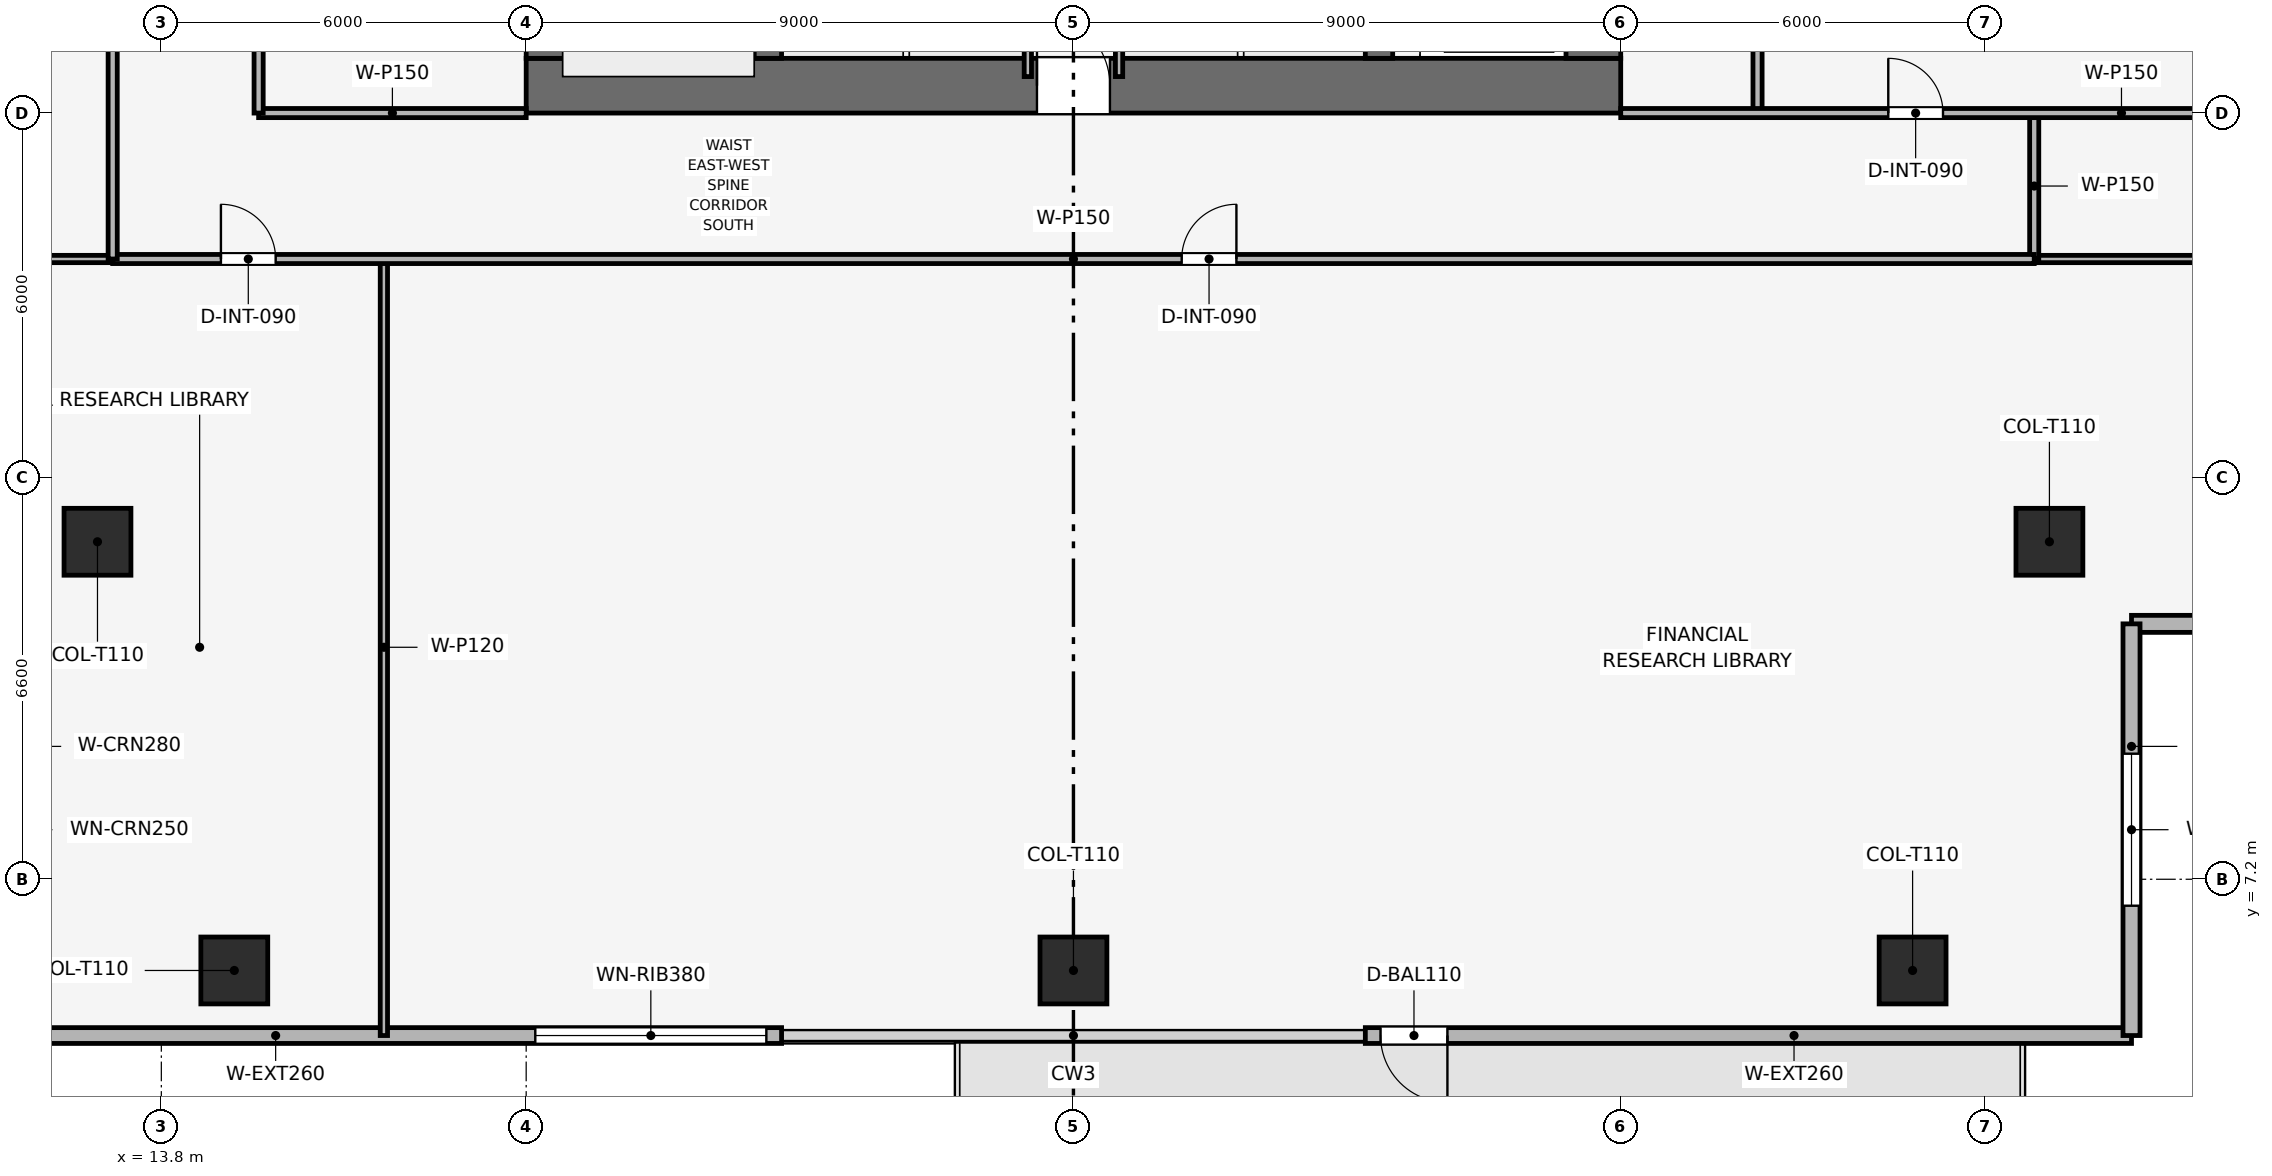
"""IFC4 building model, lengths in metres.
Left out: names, types, materials, properties, quantities, classifications, styles, units other than length and angle.
Written with IfcOpenShell. Run it as: python <this file> out.ifc"""

import sys

from ifc_helpers import new_model, si_unit, direction, frame, frame_2d, origin, origin_2d, place, context, subcontext, project, spatial, rectangle, extrude, element, fill, save


model = new_model("IFC4")
c1 = context("Model", 3, precision=1e-05, world=origin(), true_north=direction((0.0, 1.0)))
c2 = subcontext(c1, "Body", "Model", "MODEL_VIEW")
j1 = project(units=[si_unit("LENGTHUNIT", "METRE"), si_unit("PLANEANGLEUNIT", "RADIAN")], contexts=[c1])
p1 = place(None, origin())
s1 = spatial("IfcSite", under=j1, at=p1, CompositionType="ELEMENT")
p2 = place(p1, origin())
s2 = spatial("IfcBuilding", under=s1, at=p2, CompositionType="ELEMENT")
p3 = place(p2, frame((0.0, 0.0, 164.55)))
s3 = spatial("IfcBuildingStorey", under=s2, at=p3, CompositionType="ELEMENT", Elevation=164.55)
p4 = place(p3, frame((19.8, 20.25, 0.0), z_axis=(0.0, 0.0, 1.0), x_axis=(1.0, 0.0, 0.0)))
e1 = element("IfcWall", 1, at=p4, inside=s3, PredefinedType="SHEAR", context=c2, shape_type="SweptSolid", body=[
    extrude(rectangle(XDim=18.0, YDim=0.9, at=frame_2d((9.0, 0.0))), origin(), (0.0, 0.0, 1.0), 3.75),
])
p5 = place(p4, frame((8.4, 0.0, 0.0)))
e2 = element("IfcOpeningElement", 2, at=p5, cuts=e1, PredefinedType="OPENING", context=c2, shape_type="SweptSolid", body=[
    extrude(rectangle(XDim=1.2, YDim=2.2, at=frame_2d((0.6, 1.1))), frame((0.0, 0.46, 0.0), z_axis=(0.0, -1.0, 0.0), x_axis=(1.0, 0.0, 0.0)), (0.0, 0.0, 1.0), 0.92),
])
p6 = place(p3, frame((20.25, 20.7, 0.0), z_axis=(0.0, 0.0, 1.0), x_axis=(0.0, 1.0, 0.0)))
e3 = element("IfcWall", 3, at=p6, inside=s3, PredefinedType="SHEAR", context=c2, shape_type="SweptSolid", body=[
    extrude(rectangle(XDim=16.2, YDim=0.9, at=frame_2d((8.1, 0.0))), origin(), (0.0, 0.0, 1.0), 3.75),
])
p7 = place(p6, frame((10.1, 0.0, 0.0)))
e4 = element("IfcOpeningElement", 4, at=p7, cuts=e3, PredefinedType="OPENING", context=c2, shape_type="SweptSolid", body=[
    extrude(rectangle(XDim=1.1, YDim=2.15, at=frame_2d((0.55, 1.075))), frame((0.0, 0.46, 0.0), z_axis=(0.0, -1.0, 0.0), x_axis=(1.0, 0.0, 0.0)), (0.0, 0.0, 1.0), 0.92),
])
p8 = place(p3, frame((37.35, 20.7, 0.0), z_axis=(0.0, 0.0, 1.0), x_axis=(0.0, 1.0, 0.0)))
e5 = element("IfcWall", 5, at=p8, inside=s3, PredefinedType="SHEAR", context=c2, shape_type="SweptSolid", body=[
    extrude(rectangle(XDim=16.2, YDim=0.9, at=frame_2d((8.1, 0.0))), origin(), (0.0, 0.0, 1.0), 3.75),
])
p9 = place(p8, frame((4.6, 0.0, 0.0)))
e6 = element("IfcOpeningElement", 6, at=p9, cuts=e5, PredefinedType="OPENING", context=c2, shape_type="SweptSolid", body=[
    extrude(rectangle(XDim=1.1, YDim=2.15, at=frame_2d((0.55, 1.075))), frame((0.0, 0.46, 0.0), z_axis=(0.0, -1.0, 0.0), x_axis=(1.0, 0.0, 0.0)), (0.0, 0.0, 1.0), 0.92),
])
for number, where, z_axis, x_axis in (
    (7, (23.775, 20.7, 0.0), (0.0, 0.0, 1.0), (0.0, 1.0, 0.0)),
    (8, (33.825, 20.7, 0.0), (0.0, 0.0, 1.0), (0.0, 1.0, 0.0)),
):
    element("IfcWall", number, at=place(p3, frame(where, z_axis=z_axis, x_axis=x_axis)), inside=s3, PredefinedType="SHEAR", context=c2, shape_type="SweptSolid", body=[
        extrude(rectangle(XDim=16.2, YDim=0.45, at=frame_2d((8.1, 0.0))), origin(), (0.0, 0.0, 1.0), 3.75),
    ])
for number, where, z_axis, x_axis in (
    (9, (15.0, 5.7, 0.003), (0.0, 0.0, 1.0), (1.0, 0.0, 0.0)),
    (10, (28.8, 5.7, 0.003), (0.0, 0.0, 1.0), (1.0, 0.0, 0.0)),
    (11, (42.6, 5.7, 0.003), (0.0, 0.0, 1.0), (1.0, 0.0, 0.0)),
    (12, (12.75, 12.75, 0.003), (0.0, 0.0, 1.0), (1.0, 0.0, 0.0)),
    (13, (44.85, 12.75, 0.003), (0.0, 0.0, 1.0), (1.0, 0.0, 0.0)),
):
    element("IfcColumn", number, at=place(p3, frame(where, z_axis=z_axis, x_axis=x_axis)), inside=s3, PredefinedType="COLUMN", context=c2, shape_type="SweptSolid", body=[
        extrude(rectangle(XDim=1.1, YDim=1.1, at=origin_2d()), origin(), (0.0, 0.0, 1.0), 3.489),
    ])
p10 = place(p3, frame((46.2, 4.63, 0.0), z_axis=(0.0, 0.0, 1.0), x_axis=(-1.0, 0.0, 0.0)))
e14 = element("IfcWall", 14, at=p10, inside=s3, PredefinedType="SOLIDWALL", context=c2, shape_type="SweptSolid", body=[
    extrude(rectangle(XDim=12.6, YDim=0.26, at=frame_2d((6.3, 0.0))), origin(), (0.0, 0.0, 1.0), 3.495),
])
p11 = place(p10, frame((11.25, 0.0, 0.0)))
e15 = element("IfcOpeningElement", 15, at=p11, cuts=e14, PredefinedType="OPENING", context=c2, shape_type="SweptSolid", body=[
    extrude(rectangle(XDim=1.1, YDim=2.2, at=frame_2d((0.55, 1.1))), frame((0.0, 0.14, 0.0), z_axis=(0.0, -1.0, 0.0), x_axis=(1.0, 0.0, 0.0)), (0.0, 0.0, 1.0), 0.28),
])
p12 = place(p3, frame((24.0, 4.63, 0.0), z_axis=(0.0, 0.0, 1.0), x_axis=(-1.0, 0.0, 0.0)))
e16 = element("IfcWall", 16, at=p12, inside=s3, PredefinedType="SOLIDWALL", context=c2, shape_type="SweptSolid", body=[
    extrude(rectangle(XDim=12.6, YDim=0.26, at=frame_2d((6.3, 0.0))), origin(), (0.0, 0.0, 1.0), 3.495),
])
p13 = place(p12, frame((0.25, 0.0, 0.9)))
e17 = element("IfcOpeningElement", 17, at=p13, cuts=e16, PredefinedType="OPENING", context=c2, shape_type="SweptSolid", body=[
    extrude(rectangle(XDim=3.8, YDim=1.9, at=frame_2d((1.9, 0.95))), frame((0.0, 0.14, 0.0), z_axis=(0.0, -1.0, 0.0), x_axis=(1.0, 0.0, 0.0)), (0.0, 0.0, 1.0), 0.28),
])
p14 = place(p3, frame((52.97, 11.4, 0.0), z_axis=(0.0, 0.0, 1.0), x_axis=(-1.0, 0.0, 0.0)))
e18 = element("IfcWall", 18, at=p14, inside=s3, PredefinedType="SOLIDWALL", context=c2, shape_type="SweptSolid", body=[
    extrude(rectangle(XDim=6.77, YDim=0.28, at=frame_2d((3.385, 0.0))), origin(), (0.0, 0.0, 1.0), 3.495),
])
p15 = place(p14, frame((2.135, 0.0, 0.9)))
e19 = element("IfcOpeningElement", 19, at=p15, cuts=e18, PredefinedType="OPENING", context=c2, shape_type="SweptSolid", body=[
    extrude(rectangle(XDim=2.5, YDim=1.9, at=frame_2d((1.25, 0.95))), frame((0.0, 0.15, 0.0), z_axis=(0.0, -1.0, 0.0), x_axis=(1.0, 0.0, 0.0)), (0.0, 0.0, 1.0), 0.3),
])
p16 = place(p3, frame((46.2, 11.4, 0.0), z_axis=(0.0, 0.0, 1.0), x_axis=(0.0, -1.0, 0.0)))
e20 = element("IfcWall", 20, at=p16, inside=s3, PredefinedType="SOLIDWALL", context=c2, shape_type="SweptSolid", body=[
    extrude(rectangle(XDim=6.77, YDim=0.28, at=frame_2d((3.385, 0.0))), origin(), (0.0, 0.0, 1.0), 3.495),
])
p17 = place(p16, frame((2.135, 0.0, 0.9)))
e21 = element("IfcOpeningElement", 21, at=p17, cuts=e20, PredefinedType="OPENING", context=c2, shape_type="SweptSolid", body=[
    extrude(rectangle(XDim=2.5, YDim=1.9, at=frame_2d((1.25, 0.95))), frame((0.0, 0.15, 0.0), z_axis=(0.0, -1.0, 0.0), x_axis=(1.0, 0.0, 0.0)), (0.0, 0.0, 1.0), 0.3),
])
for number, where, z_axis, x_axis in (
    (22, (28.05, 20.4, 0.0), (0.0, 0.0, 1.0), (0.0, 1.0, 0.0)),
    (23, (29.55, 20.4, 0.0), (0.0, 0.0, 1.0), (0.0, 1.0, 0.0)),
):
    element("IfcWall", number, at=place(p3, frame(where, z_axis=z_axis, x_axis=x_axis)), inside=s3, PredefinedType="PARTITIONING", context=c2, shape_type="SweptSolid", body=[
        extrude(rectangle(XDim=2.75, YDim=0.12, at=frame_2d((1.375, 0.0))), origin(), (0.0, 0.0, 1.0), 3.495),
    ])
p18 = place(p3, frame((15.4, 19.8, 0.0), z_axis=(0.0, 0.0, 1.0), x_axis=(1.0, 0.0, 0.0)))
e24 = element("IfcWall", 24, at=p18, inside=s3, PredefinedType="PARTITIONING", context=c2, shape_type="SweptSolid", body=[
    extrude(rectangle(XDim=4.4, YDim=0.15, at=frame_2d((2.2, 0.0))), origin(), (0.0, 0.0, 1.0), 3.03),
])
p19 = place(p3, frame((15.4, 19.8, 0.0), z_axis=(0.0, 0.0, 1.0), x_axis=(0.0, 1.0, 0.0)))
e25 = element("IfcWall", 25, at=p19, inside=s3, PredefinedType="PARTITIONING", context=c2, shape_type="SweptSolid", body=[
    extrude(rectangle(XDim=10.35, YDim=0.15, at=frame_2d((5.175, 0.0))), origin(), (0.0, 0.0, 1.0), 3.03),
])
p20 = place(p19, frame((1.2, 0.0, 0.0)))
e26 = element("IfcOpeningElement", 26, at=p20, cuts=e25, PredefinedType="OPENING", context=c2, shape_type="SweptSolid", body=[
    extrude(rectangle(XDim=0.9, YDim=2.1, at=frame_2d((0.45, 1.05))), frame((0.0, 0.085, 0.0), z_axis=(0.0, -1.0, 0.0), x_axis=(1.0, 0.0, 0.0)), (0.0, 0.0, 1.0), 0.17),
])
p21 = place(p19, frame((4.7, 0.0, 0.0)))
e27 = element("IfcOpeningElement", 27, at=p21, cuts=e25, PredefinedType="OPENING", context=c2, shape_type="SweptSolid", body=[
    extrude(rectangle(XDim=0.9, YDim=2.1, at=frame_2d((0.45, 1.05))), frame((0.0, 0.085, 0.0), z_axis=(0.0, -1.0, 0.0), x_axis=(1.0, 0.0, 0.0)), (0.0, 0.0, 1.0), 0.17),
])
p22 = place(p19, frame((8.1, 0.0, 0.0)))
e28 = element("IfcOpeningElement", 28, at=p22, cuts=e25, PredefinedType="OPENING", context=c2, shape_type="SweptSolid", body=[
    extrude(rectangle(XDim=0.95, YDim=2.1, at=frame_2d((0.475, 1.05))), frame((0.0, 0.085, 0.0), z_axis=(0.0, -1.0, 0.0), x_axis=(1.0, 0.0, 0.0)), (0.0, 0.0, 1.0), 0.17),
])
p23 = place(p3, frame((40.05, 19.8, 0.0), z_axis=(0.0, 0.0, 1.0), x_axis=(0.0, 1.0, 0.0)))
e29 = element("IfcWall", 29, at=p23, inside=s3, PredefinedType="PARTITIONING", context=c2, shape_type="SweptSolid", body=[
    extrude(rectangle(XDim=7.05, YDim=0.15, at=frame_2d((3.525, 0.0))), origin(), (0.0, 0.0, 1.0), 3.03),
])
p24 = place(p3, frame((17.46, 4.63, 0.0), z_axis=(0.0, 0.0, 1.0), x_axis=(0.0, 1.0, 0.0)))
e30 = element("IfcWall", 30, at=p24, inside=s3, PredefinedType="PARTITIONING", context=c2, shape_type="SweptSolid", body=[
    extrude(rectangle(XDim=12.77, YDim=0.12, at=frame_2d((6.385, 0.0))), origin(), (0.0, 0.0, 1.0), 2.98),
])
p25 = place(p3, frame((4.63, 17.4, 0.0), z_axis=(0.0, 0.0, 1.0), x_axis=(1.0, 0.0, 0.0)))
e31 = element("IfcWall", 31, at=p25, inside=s3, PredefinedType="PARTITIONING", context=c2, shape_type="SweptSolid", body=[
    extrude(rectangle(XDim=8.37, YDim=0.12, at=frame_2d((4.185, 0.0))), origin(), (0.0, 0.0, 1.0), 2.98),
])
p26 = place(p3, frame((44.6, 17.4, 0.0), z_axis=(0.0, 0.0, 1.0), x_axis=(1.0, 0.0, 0.0)))
e32 = element("IfcWall", 32, at=p26, inside=s3, PredefinedType="PARTITIONING", context=c2, shape_type="SweptSolid", body=[
    extrude(rectangle(XDim=8.37, YDim=0.12, at=frame_2d((4.185, 0.0))), origin(), (0.0, 0.0, 1.0), 2.98),
])
p27 = place(p3, frame((44.6, 17.4, 0.0), z_axis=(0.0, 0.0, 1.0), x_axis=(0.0, 1.0, 0.0)))
e33 = element("IfcWall", 33, at=p27, inside=s3, PredefinedType="PARTITIONING", context=c2, shape_type="SweptSolid", body=[
    extrude(rectangle(XDim=2.4, YDim=0.15, at=frame_2d((1.2, 0.0))), origin(), (0.0, 0.0, 1.0), 3.495),
])
p28 = place(p3, frame((37.8, 19.8, 0.0), z_axis=(0.0, 0.0, 1.0), x_axis=(1.0, 0.0, 0.0)))
e34 = element("IfcWall", 34, at=p28, inside=s3, PredefinedType="PARTITIONING", context=c2, shape_type="SweptSolid", body=[
    extrude(rectangle(XDim=15.17, YDim=0.15, at=frame_2d((7.585, 0.0))), origin(), (0.0, 0.0, 1.0), 2.98),
])
p29 = place(p28, frame((4.4, 0.0, 0.0)))
e35 = element("IfcOpeningElement", 35, at=p29, cuts=e34, PredefinedType="OPENING", context=c2, shape_type="SweptSolid", body=[
    extrude(rectangle(XDim=0.9, YDim=2.1, at=frame_2d((0.45, 1.05))), frame((0.0, 0.085, 0.0), z_axis=(0.0, -1.0, 0.0), x_axis=(1.0, 0.0, 0.0)), (0.0, 0.0, 1.0), 0.17),
])
p30 = place(p3, frame((13.0, 17.4, 0.0), z_axis=(0.0, 0.0, 1.0), x_axis=(1.0, 0.0, 0.0)))
e36 = element("IfcWall", 36, at=p30, inside=s3, PredefinedType="PARTITIONING", context=c2, shape_type="SweptSolid", body=[
    extrude(rectangle(XDim=31.6, YDim=0.15, at=frame_2d((15.8, 0.0))), origin(), (0.0, 0.0, 1.0), 3.03),
])
p31 = place(p30, frame((1.78, 0.0, 0.0)))
e37 = element("IfcOpeningElement", 37, at=p31, cuts=e36, PredefinedType="OPENING", context=c2, shape_type="SweptSolid", body=[
    extrude(rectangle(XDim=0.9, YDim=2.1, at=frame_2d((0.45, 1.05))), frame((0.0, 0.085, 0.0), z_axis=(0.0, -1.0, 0.0), x_axis=(1.0, 0.0, 0.0)), (0.0, 0.0, 1.0), 0.17),
])
p32 = place(p30, frame((17.58, 0.0, 0.0)))
e38 = element("IfcOpeningElement", 38, at=p32, cuts=e36, PredefinedType="OPENING", context=c2, shape_type="SweptSolid", body=[
    extrude(rectangle(XDim=0.9, YDim=2.1, at=frame_2d((0.45, 1.05))), frame((0.0, 0.085, 0.0), z_axis=(0.0, -1.0, 0.0), x_axis=(1.0, 0.0, 0.0)), (0.0, 0.0, 1.0), 0.17),
])
p33 = place(p3, frame((13.0, 17.4, 0.0), z_axis=(0.0, 0.0, 1.0), x_axis=(0.0, 1.0, 0.0)))
e39 = element("IfcWall", 39, at=p33, inside=s3, PredefinedType="PARTITIONING", context=c2, shape_type="SweptSolid", body=[
    extrude(rectangle(XDim=22.8, YDim=0.15, at=frame_2d((11.4, 0.0))), origin(), (0.0, 0.0, 1.0), 3.03),
])
p34 = place(p33, frame((6.115, 0.0, 0.0)))
e40 = element("IfcOpeningElement", 40, at=p34, cuts=e39, PredefinedType="OPENING", context=c2, shape_type="SweptSolid", body=[
    extrude(rectangle(XDim=0.9, YDim=2.1, at=frame_2d((0.45, 1.05))), frame((0.0, 0.085, 0.0), z_axis=(0.0, -1.0, 0.0), x_axis=(1.0, 0.0, 0.0)), (0.0, 0.0, 1.0), 0.17),
])
p35 = place(p33, frame((15.115, 0.0, 0.0)))
e41 = element("IfcOpeningElement", 41, at=p35, cuts=e39, PredefinedType="OPENING", context=c2, shape_type="SweptSolid", body=[
    extrude(rectangle(XDim=0.9, YDim=2.1, at=frame_2d((0.45, 1.05))), frame((0.0, 0.085, 0.0), z_axis=(0.0, -1.0, 0.0), x_axis=(1.0, 0.0, 0.0)), (0.0, 0.0, 1.0), 0.17),
])
p36 = place(p11, origin())
e42 = element("IfcDoor", 42, at=p36, inside=s3, OperationType="SINGLE_SWING_LEFT", PredefinedType="DOOR", context=c2, shape_type="SweptSolid", body=[
    extrude(rectangle(XDim=1.1, YDim=2.2, at=frame_2d((0.55, 1.1))), frame((0.0, 0.025, 0.0), z_axis=(0.0, -1.0, 0.0), x_axis=(1.0, 0.0, 0.0)), (0.0, 0.0, 1.0), 0.05),
])
fill(e15, e42)
p37 = place(p13, origin())
e43 = element("IfcWindow", 43, at=p37, inside=s3, PartitioningType="SINGLE_PANEL", PredefinedType="WINDOW", context=c2, shape_type="SweptSolid", body=[
    extrude(rectangle(XDim=3.8, YDim=1.9, at=frame_2d((1.9, 0.95))), frame((0.0, 0.03, 0.0), z_axis=(0.0, -1.0, 0.0), x_axis=(1.0, 0.0, 0.0)), (0.0, 0.0, 1.0), 0.06),
])
fill(e17, e43)
p38 = place(p17, origin())
e44 = element("IfcWindow", 44, at=p38, inside=s3, PartitioningType="SINGLE_PANEL", PredefinedType="WINDOW", context=c2, shape_type="SweptSolid", body=[
    extrude(rectangle(XDim=2.5, YDim=1.9, at=frame_2d((1.25, 0.95))), frame((0.0, 0.03, 0.0), z_axis=(0.0, -1.0, 0.0), x_axis=(1.0, 0.0, 0.0)), (0.0, 0.0, 1.0), 0.06),
])
fill(e21, e44)
p39 = place(p29, origin())
e45 = element("IfcDoor", 45, at=p39, inside=s3, OperationType="SINGLE_SWING_LEFT", PredefinedType="DOOR", context=c2, shape_type="SweptSolid", body=[
    extrude(rectangle(XDim=0.9, YDim=2.1, at=frame_2d((0.45, 1.05))), frame((0.0, 0.025, 0.0), z_axis=(0.0, -1.0, 0.0), x_axis=(1.0, 0.0, 0.0)), (0.0, 0.0, 1.0), 0.05),
])
fill(e35, e45)
p40 = place(p31, origin())
e46 = element("IfcDoor", 46, at=p40, inside=s3, OperationType="SINGLE_SWING_LEFT", PredefinedType="DOOR", context=c2, shape_type="SweptSolid", body=[
    extrude(rectangle(XDim=0.9, YDim=2.1, at=frame_2d((0.45, 1.05))), frame((0.0, 0.025, 0.0), z_axis=(0.0, -1.0, 0.0), x_axis=(1.0, 0.0, 0.0)), (0.0, 0.0, 1.0), 0.05),
])
fill(e37, e46)
p41 = place(p32, origin())
e47 = element("IfcDoor", 47, at=p41, inside=s3, OperationType="SINGLE_SWING_RIGHT", PredefinedType="DOOR", context=c2, shape_type="SweptSolid", body=[
    extrude(rectangle(XDim=0.9, YDim=2.1, at=frame_2d((0.45, 1.05))), frame((0.0, 0.025, 0.0), z_axis=(0.0, -1.0, 0.0), x_axis=(1.0, 0.0, 0.0)), (0.0, 0.0, 1.0), 0.05),
])
fill(e38, e47)
p42 = place(p5, origin())
e48 = element("IfcDoor", 48, at=p42, inside=s3, OperationType="SINGLE_SWING_LEFT", PredefinedType="DOOR", context=c2, shape_type="SweptSolid", body=[
    extrude(rectangle(XDim=1.2, YDim=2.2, at=frame_2d((0.6, 1.1))), frame((0.0, 0.025, 0.0), z_axis=(0.0, -1.0, 0.0), x_axis=(1.0, 0.0, 0.0)), (0.0, 0.0, 1.0), 0.05),
])
fill(e2, e48)
save(model, sys.argv[1])
